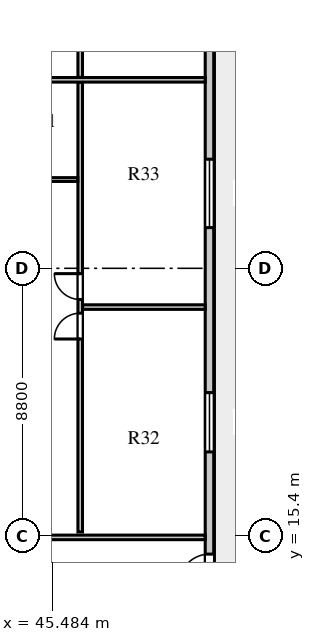
"""IFC4 building model, lengths in metres.
Left out: names, types, materials, properties, quantities, classifications, styles, units other than length and angle.
Written with IfcOpenShell. Run it as: python <this file> out.ifc"""

import sys

from ifc_helpers import new_model, si_unit, direction, frame, frame_2d, origin, place, context, subcontext, project, spatial, rectangle, extrude, element, fill, save


model = new_model("IFC4")
c1 = context("Model", 3, precision=1e-05, world=origin(), true_north=direction((0.0, 1.0)))
c2 = subcontext(c1, "Body", "Model", "MODEL_VIEW")
j1 = project(units=[si_unit("LENGTHUNIT", "METRE"), si_unit("PLANEANGLEUNIT", "RADIAN")], contexts=[c1])
p1 = place(None, origin())
s1 = spatial("IfcSite", under=j1, at=p1, CompositionType="ELEMENT")
p2 = place(p1, origin())
s2 = spatial("IfcBuilding", under=s1, at=p2, CompositionType="ELEMENT")
p3 = place(p2, frame((0.0, 0.0, 237.5)))
s3 = spatial("IfcBuildingStorey", under=s2, at=p3, CompositionType="ELEMENT", Elevation=237.5)
p4 = place(p3, frame((50.66, 13.13, 0.0), z_axis=(0.0, 0.0, 1.0), x_axis=(0.0, 1.0, 0.0)))
e1 = element("IfcWall", 1, at=p4, inside=s3, PredefinedType="STANDARD", context=c2, shape_type="SweptSolid", body=[
    extrude(rectangle(XDim=30.94, YDim=0.28, at=frame_2d((15.47, 0.0))), origin(), (0.0, 0.0, 1.0), 3.66),
])
p5 = place(p4, frame((0.67, 0.0, 0.0)))
e2 = element("IfcOpeningElement", 2, at=p5, cuts=e1, PredefinedType="OPENING", context=c2, shape_type="SweptSolid", body=[
    extrude(rectangle(XDim=1.0, YDim=2.05, at=frame_2d((0.5, 1.025))), frame((0.0, 0.15, 0.0), z_axis=(0.0, -1.0, 0.0), x_axis=(1.0, 0.0, 0.0)), (0.0, 0.0, 1.0), 0.3),
])
p6 = place(p4, frame((5.032, 0.0, 0.8)))
e3 = element("IfcOpeningElement", 3, at=p6, cuts=e1, PredefinedType="OPENING", context=c2, shape_type="SweptSolid", body=[
    extrude(rectangle(XDim=1.95, YDim=2.0, at=frame_2d((0.975, 1.0))), frame((0.0, 0.15, 0.0), z_axis=(0.0, -1.0, 0.0), x_axis=(1.0, 0.0, 0.0)), (0.0, 0.0, 1.0), 0.3),
])
p7 = place(p4, frame((12.408, 0.0, 0.8)))
e4 = element("IfcOpeningElement", 4, at=p7, cuts=e1, PredefinedType="OPENING", context=c2, shape_type="SweptSolid", body=[
    extrude(rectangle(XDim=2.25, YDim=2.0, at=frame_2d((1.125, 1.0))), frame((0.0, 0.15, 0.0), z_axis=(0.0, -1.0, 0.0), x_axis=(1.0, 0.0, 0.0)), (0.0, 0.0, 1.0), 0.3),
])
p8 = place(p4, frame((19.207, 0.0, 0.8)))
e5 = element("IfcOpeningElement", 5, at=p8, cuts=e1, PredefinedType="OPENING", context=c2, shape_type="SweptSolid", body=[
    extrude(rectangle(XDim=1.8, YDim=2.0, at=frame_2d((0.9, 1.0))), frame((0.0, 0.15, 0.0), z_axis=(0.0, -1.0, 0.0), x_axis=(1.0, 0.0, 0.0)), (0.0, 0.0, 1.0), 0.3),
])
p9 = place(p4, frame((25.082, 0.0, 0.8)))
e6 = element("IfcOpeningElement", 6, at=p9, cuts=e1, PredefinedType="OPENING", context=c2, shape_type="SweptSolid", body=[
    extrude(rectangle(XDim=1.5, YDim=2.0, at=frame_2d((0.75, 1.0))), frame((0.0, 0.15, 0.0), z_axis=(0.0, -1.0, 0.0), x_axis=(1.0, 0.0, 0.0)), (0.0, 0.0, 1.0), 0.3),
])
p10 = place(p4, frame((29.175, 0.0, 0.8)))
e7 = element("IfcOpeningElement", 7, at=p10, cuts=e1, PredefinedType="OPENING", context=c2, shape_type="SweptSolid", body=[
    extrude(rectangle(XDim=1.2, YDim=1.75, at=frame_2d((0.6, 0.875))), frame((0.0, 0.15, 0.0), z_axis=(0.0, -1.0, 0.0), x_axis=(1.0, 0.0, 0.0)), (0.0, 0.0, 1.0), 0.3),
])
p11 = place(p3, frame((39.15, 15.35, 0.0), z_axis=(0.0, 0.0, 1.0), x_axis=(1.0, 0.0, 0.0)))
e8 = element("IfcWall", 8, at=p11, inside=s3, PredefinedType="PARTITIONING", context=c2, shape_type="SweptSolid", body=[
    extrude(rectangle(XDim=11.37, YDim=0.15, at=frame_2d((5.685, 0.0))), origin(), (0.0, 0.0, 1.0), 3.06),
])
p12 = place(p3, frame((46.408, 15.53, 0.0), z_axis=(0.0, 0.0, 1.0), x_axis=(0.0, 1.0, 0.0)))
e9 = element("IfcWall", 9, at=p12, inside=s3, PredefinedType="PARTITIONING", context=c2, shape_type="SweptSolid", body=[
    extrude(rectangle(XDim=14.79, YDim=0.15, at=frame_2d((7.395, 0.0))), origin(), (0.0, 0.0, 1.0), 3.66),
])
p13 = place(p12, frame((6.345, 0.0, 0.0)))
e10 = element("IfcOpeningElement", 10, at=p13, cuts=e9, PredefinedType="OPENING", context=c2, shape_type="SweptSolid", body=[
    extrude(rectangle(XDim=0.85, YDim=2.08, at=frame_2d((0.425, 1.04))), frame((0.0, 0.085, 0.0), z_axis=(0.0, -1.0, 0.0), x_axis=(1.0, 0.0, 0.0)), (0.0, 0.0, 1.0), 0.17),
])
p14 = place(p12, frame((7.645, 0.0, 0.0)))
e11 = element("IfcOpeningElement", 11, at=p14, cuts=e9, PredefinedType="OPENING", context=c2, shape_type="SweptSolid", body=[
    extrude(rectangle(XDim=0.85, YDim=2.08, at=frame_2d((0.425, 1.04))), frame((0.0, 0.085, 0.0), z_axis=(0.0, -1.0, 0.0), x_axis=(1.0, 0.0, 0.0)), (0.0, 0.0, 1.0), 0.17),
])
p15 = place(p3, frame((41.58, 27.12, 0.0), z_axis=(0.0, 0.0, 1.0), x_axis=(1.0, 0.0, 0.0)))
e12 = element("IfcWall", 12, at=p15, inside=s3, PredefinedType="PLUMBINGWALL", context=c2, shape_type="SweptSolid", body=[
    extrude(rectangle(XDim=4.748, YDim=0.125, at=frame_2d((2.374, 0.0))), origin(), (0.0, 0.0, 1.0), 3.31),
])
p16 = place(p15, frame((0.16, 0.0, 0.0)))
e13 = element("IfcOpeningElement", 13, at=p16, cuts=e12, PredefinedType="OPENING", context=c2, shape_type="SweptSolid", body=[
    extrude(rectangle(XDim=0.8, YDim=2.05, at=frame_2d((0.4, 1.025))), frame((0.0, 0.073, 0.0), z_axis=(0.0, -1.0, 0.0), x_axis=(1.0, 0.0, 0.0)), (0.0, 0.0, 1.0), 0.145),
])
p17 = place(p15, frame((2.539, 0.0, 0.0)))
e14 = element("IfcOpeningElement", 14, at=p17, cuts=e12, PredefinedType="OPENING", context=c2, shape_type="SweptSolid", body=[
    extrude(rectangle(XDim=0.8, YDim=2.05, at=frame_2d((0.4, 1.025))), frame((0.0, 0.073, 0.0), z_axis=(0.0, -1.0, 0.0), x_axis=(1.0, 0.0, 0.0)), (0.0, 0.0, 1.0), 0.145),
])
p18 = place(p3, frame((46.488, 22.925, 0.0), z_axis=(0.0, 0.0, 1.0), x_axis=(1.0, 0.0, 0.0)))
e15 = element("IfcWall", 15, at=p18, inside=s3, PredefinedType="PARTITIONING", context=c2, shape_type="SweptSolid", body=[
    extrude(rectangle(XDim=4.032, YDim=0.15, at=frame_2d((2.016, 0.0))), origin(), (0.0, 0.0, 1.0), 3.66),
])
p19 = place(p3, frame((41.56, 30.4, 0.0), z_axis=(0.0, 0.0, 1.0), x_axis=(1.0, 0.0, 0.0)))
e16 = element("IfcWall", 16, at=p19, inside=s3, PredefinedType="PARTITIONING", context=c2, shape_type="SweptSolid", body=[
    extrude(rectangle(XDim=8.96, YDim=0.15, at=frame_2d((4.48, 0.0))), origin(), (0.0, 0.0, 1.0), 3.66),
])
p20 = place(p3, frame((46.408, 30.48, 0.0), z_axis=(0.0, 0.0, 1.0), x_axis=(0.0, 1.0, 0.0)))
e17 = element("IfcWall", 17, at=p20, inside=s3, PredefinedType="PARTITIONING", context=c2, shape_type="SweptSolid", body=[
    extrude(rectangle(XDim=11.19, YDim=0.15, at=frame_2d((5.595, 0.0))), origin(), (0.0, 0.0, 1.0), 3.66),
])
p21 = place(p20, frame((4.545, 0.0, 0.0)))
e18 = element("IfcOpeningElement", 18, at=p21, cuts=e17, PredefinedType="OPENING", context=c2, shape_type="SweptSolid", body=[
    extrude(rectangle(XDim=0.85, YDim=2.08, at=frame_2d((0.425, 1.04))), frame((0.0, 0.085, 0.0), z_axis=(0.0, -1.0, 0.0), x_axis=(1.0, 0.0, 0.0)), (0.0, 0.0, 1.0), 0.17),
])
p22 = place(p20, frame((5.845, 0.0, 0.0)))
e19 = element("IfcOpeningElement", 19, at=p22, cuts=e17, PredefinedType="OPENING", context=c2, shape_type="SweptSolid", body=[
    extrude(rectangle(XDim=0.85, YDim=2.08, at=frame_2d((0.425, 1.04))), frame((0.0, 0.085, 0.0), z_axis=(0.0, -1.0, 0.0), x_axis=(1.0, 0.0, 0.0)), (0.0, 0.0, 1.0), 0.17),
])
p23 = place(p5, frame((1.0, 0.0, 0.0), z_axis=(0.0, 0.0, 1.0), x_axis=(-1.0, 0.0, 0.0)))
e20 = element("IfcDoor", 20, at=p23, inside=s3, OperationType="SINGLE_SWING_RIGHT", PredefinedType="DOOR", context=c2, shape_type="SweptSolid", body=[
    extrude(rectangle(XDim=1.0, YDim=2.05, at=frame_2d((0.5, 1.025))), frame((0.0, 0.025, 0.0), z_axis=(0.0, -1.0, 0.0), x_axis=(1.0, 0.0, 0.0)), (0.0, 0.0, 1.0), 0.05),
])
fill(e2, e20)
p24 = place(p6, origin())
e21 = element("IfcWindow", 21, at=p24, inside=s3, PartitioningType="SINGLE_PANEL", PredefinedType="WINDOW", context=c2, shape_type="SweptSolid", body=[
    extrude(rectangle(XDim=1.95, YDim=2.0, at=frame_2d((0.975, 1.0))), frame((0.0, 0.03, 0.0), z_axis=(0.0, -1.0, 0.0), x_axis=(1.0, 0.0, 0.0)), (0.0, 0.0, 1.0), 0.06),
])
fill(e3, e21)
p25 = place(p7, origin())
e22 = element("IfcWindow", 22, at=p25, inside=s3, PartitioningType="SINGLE_PANEL", PredefinedType="WINDOW", context=c2, shape_type="SweptSolid", body=[
    extrude(rectangle(XDim=2.25, YDim=2.0, at=frame_2d((1.125, 1.0))), frame((0.0, 0.03, 0.0), z_axis=(0.0, -1.0, 0.0), x_axis=(1.0, 0.0, 0.0)), (0.0, 0.0, 1.0), 0.06),
])
fill(e4, e22)
p26 = place(p13, origin())
e23 = element("IfcDoor", 23, at=p26, inside=s3, OperationType="SINGLE_SWING_LEFT", PredefinedType="DOOR", context=c2, shape_type="SweptSolid", body=[
    extrude(rectangle(XDim=0.85, YDim=2.08, at=frame_2d((0.425, 1.04))), frame((0.0, 0.025, 0.0), z_axis=(0.0, -1.0, 0.0), x_axis=(1.0, 0.0, 0.0)), (0.0, 0.0, 1.0), 0.05),
])
fill(e10, e23)
p27 = place(p14, origin())
e24 = element("IfcDoor", 24, at=p27, inside=s3, OperationType="SINGLE_SWING_RIGHT", PredefinedType="DOOR", context=c2, shape_type="SweptSolid", body=[
    extrude(rectangle(XDim=0.85, YDim=2.08, at=frame_2d((0.425, 1.04))), frame((0.0, 0.025, 0.0), z_axis=(0.0, -1.0, 0.0), x_axis=(1.0, 0.0, 0.0)), (0.0, 0.0, 1.0), 0.05),
])
fill(e11, e24)
save(model, sys.argv[1])
